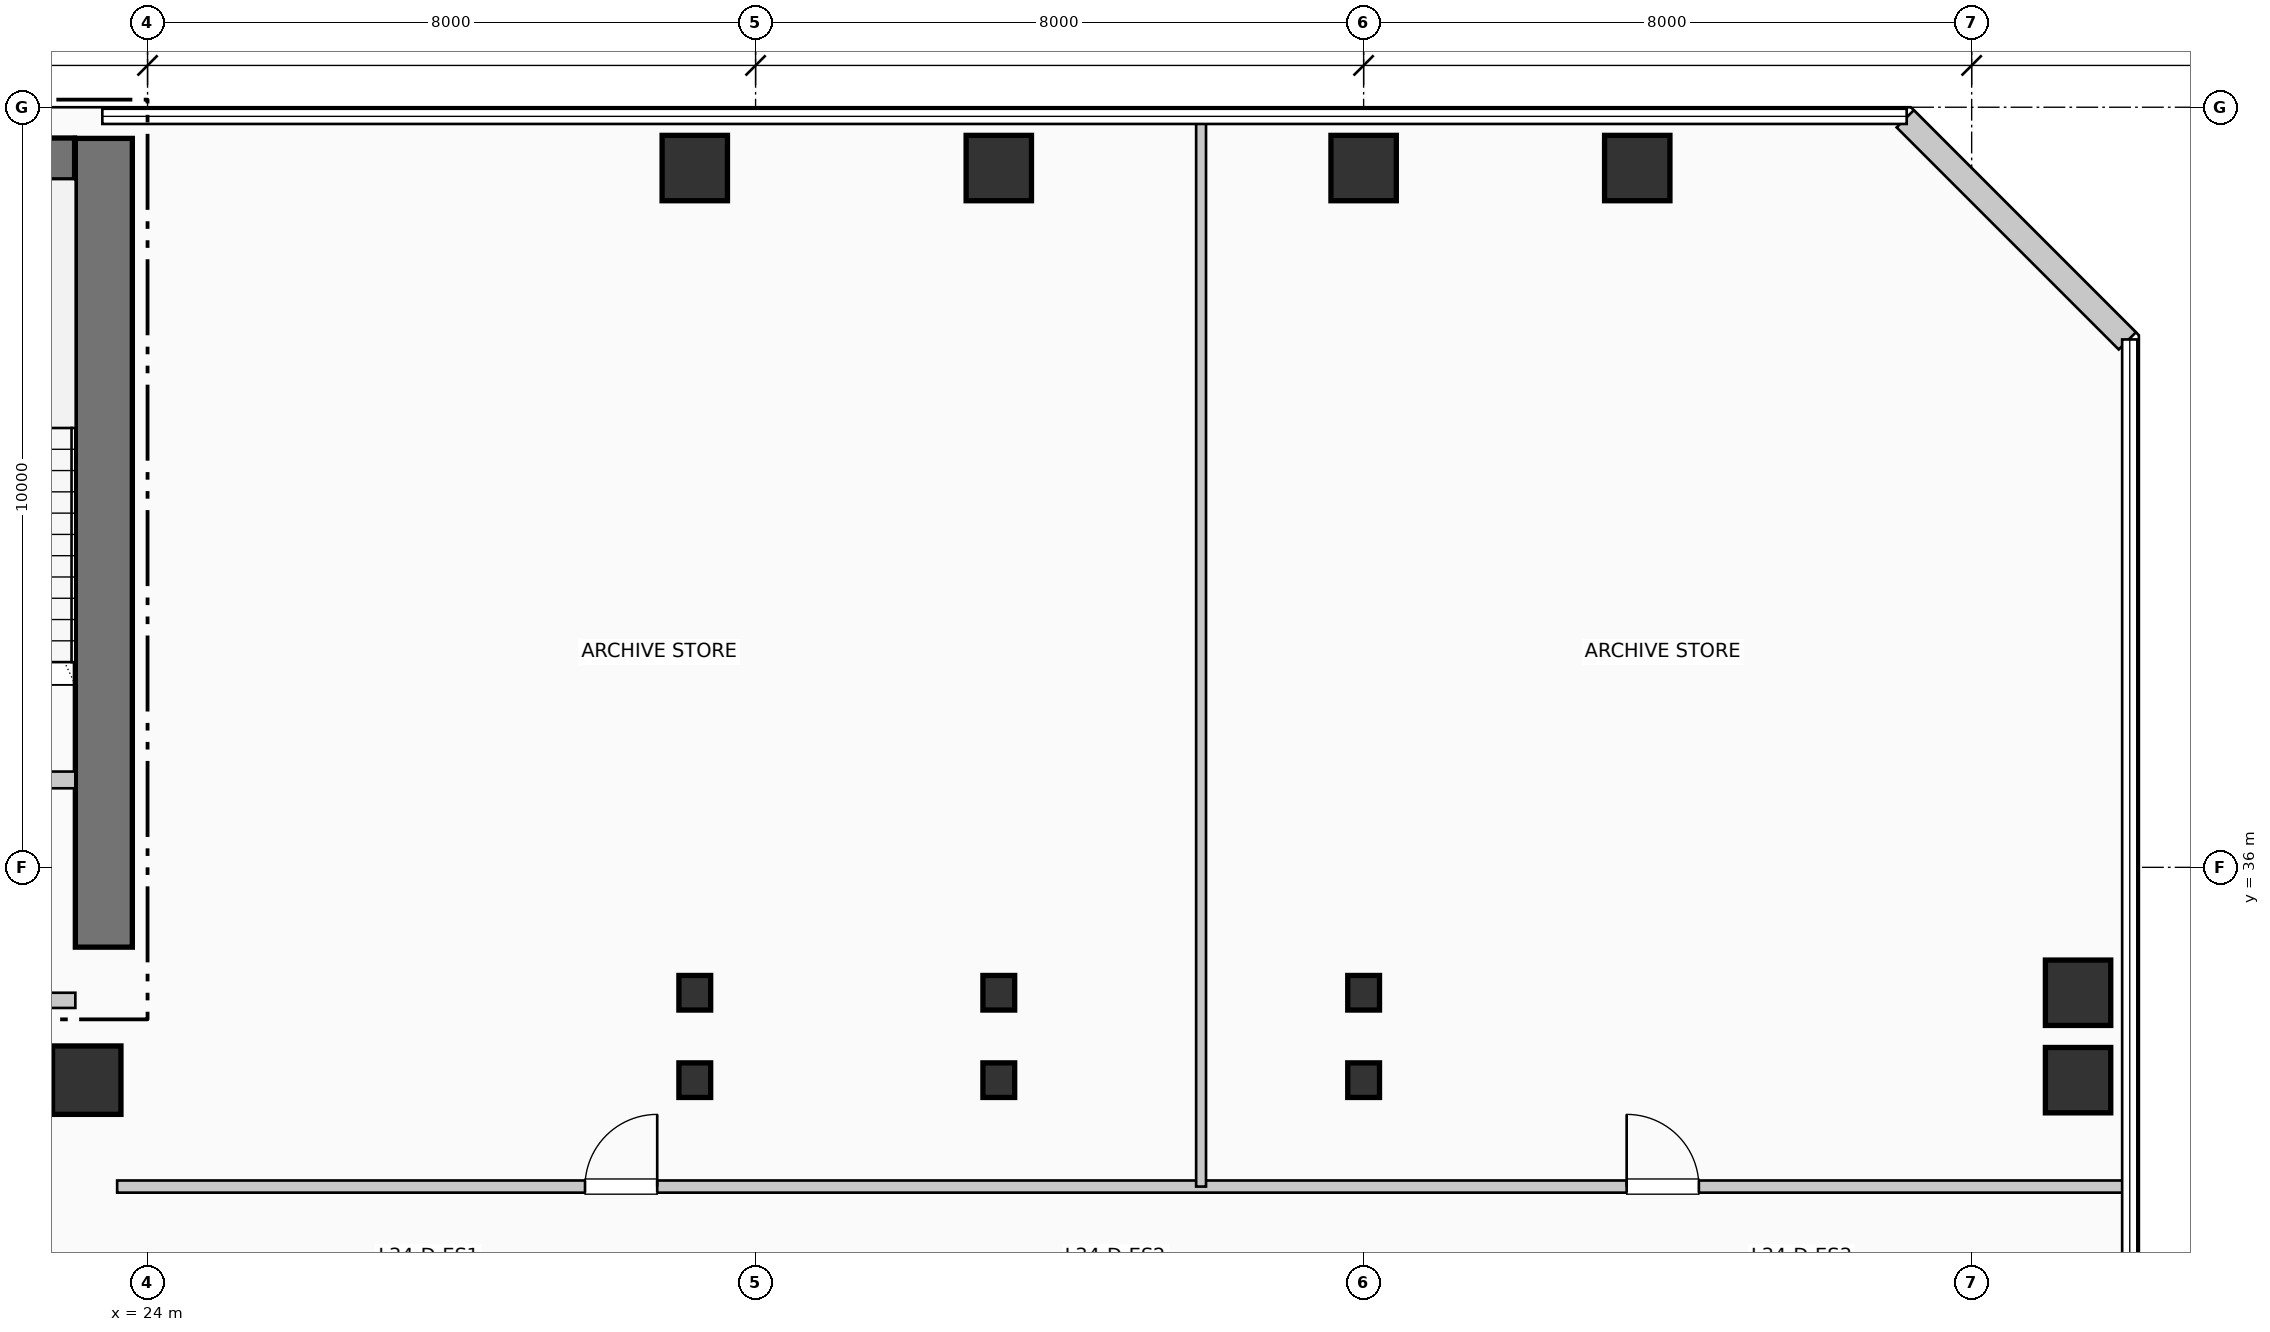
"""IFC4 building model, lengths in metres.
Left out: names, types, materials, properties, quantities, classifications, styles, units other than length and angle.
Written with IfcOpenShell. Run it as: python <this file> out.ifc"""

import sys

from ifc_helpers import new_model, si_unit, direction, frame, frame_2d, origin, origin_2d, place, context, subcontext, project, spatial, rectangle, i_section, extrude, element, fill, save


model = new_model("IFC4")
c1 = context("Model", 3, precision=1e-05, world=origin(), true_north=direction((0.0, 1.0)))
c2 = subcontext(c1, "Body", "Model", "MODEL_VIEW")
j1 = project(units=[si_unit("LENGTHUNIT", "METRE"), si_unit("PLANEANGLEUNIT", "RADIAN")], contexts=[c1])
p1 = place(None, origin())
s1 = spatial("IfcSite", under=j1, at=p1, CompositionType="ELEMENT")
p2 = place(p1, origin())
s2 = spatial("IfcBuilding", under=s1, at=p2, CompositionType="ELEMENT")
p3 = place(p2, frame((0.0, 0.0, 142.89)))
s3 = spatial("IfcBuildingStorey", under=s2, at=p3, CompositionType="ELEMENT", Elevation=142.89)
p4 = place(p3, frame((23.425, 34.95, 0.0), z_axis=(0.0, 0.0, 1.0), x_axis=(0.0, 1.0, 0.0)))
e1 = element("IfcWall", 1, at=p4, inside=s3, PredefinedType="SHEAR", context=c2, shape_type="SweptSolid", body=[
    extrude(rectangle(XDim=10.64, YDim=0.75, at=frame_2d((5.32, 0.0))), origin(), (0.0, 0.0, 1.0), 3.96),
])
p5 = place(p3, frame((19.35, 45.32, 0.0), z_axis=(0.0, 0.0, 1.0), x_axis=(1.0, 0.0, 0.0)))
e2 = element("IfcWall", 2, at=p5, inside=s3, PredefinedType="SHEAR", context=c2, shape_type="SweptSolid", body=[
    extrude(rectangle(XDim=3.69, YDim=0.55, at=frame_2d((1.845, 0.0))), origin(), (0.0, 0.0, 1.0), 3.96),
])
p6 = place(p5, frame((1.15, 0.0, 1.05)))
e3 = element("IfcOpeningElement", 3, at=p6, cuts=e2, PredefinedType="OPENING", context=c2, shape_type="SweptSolid", body=[
    extrude(rectangle(XDim=1.4, YDim=1.8, at=frame_2d((0.7, 0.9))), frame((0.0, 0.285, 0.0), z_axis=(0.0, -1.0, 0.0), x_axis=(1.0, 0.0, 0.0)), (0.0, 0.0, 1.0), 0.57),
])
p7 = place(p3, frame((23.2, 33.2, 0.0), z_axis=(0.0, 0.0, 1.0), x_axis=(1.0, 0.0, 0.0)))
e4 = element("IfcColumn", 4, at=p7, inside=s3, PredefinedType="COLUMN", context=c2, shape_type="SweptSolid", body=[
    extrude(rectangle(XDim=0.9, YDim=0.9, at=origin_2d()), origin(), (0.0, 0.0, 1.0), 3.96),
])
for number, where, z_axis, x_axis in (
    (5, (31.2, 33.2, 0.0), (0.0, 0.0, 1.0), (1.0, 0.0, 0.0)),
    (6, (31.2, 34.35, 0.0), (0.0, 0.0, 1.0), (1.0, 0.0, 0.0)),
):
    element("IfcColumn", number, at=place(p3, frame(where, z_axis=z_axis, x_axis=x_axis)), inside=s3, PredefinedType="COLUMN", context=c2, shape_type="SweptSolid", body=[
        extrude(i_section(OverallWidth=0.418, OverallDepth=0.455, WebThickness=0.032, FlangeThickness=0.051, at=origin_2d()), origin(), (0.0, 0.0, 1.0), 3.96),
    ])
p8 = place(p3, frame((31.2, 45.2, 0.0), z_axis=(0.0, 0.0, 1.0), x_axis=(1.0, 0.0, 0.0)))
e7 = element("IfcColumn", 7, at=p8, inside=s3, PredefinedType="COLUMN", context=c2, shape_type="SweptSolid", body=[
    extrude(rectangle(XDim=0.86, YDim=0.86, at=origin_2d()), origin(), (0.0, 0.0, 1.0), 3.96),
])
for number, where, z_axis, x_axis in (
    (8, (35.2, 33.2, 0.0), (0.0, 0.0, 1.0), (1.0, 0.0, 0.0)),
    (9, (35.2, 34.35, 0.0), (0.0, 0.0, 1.0), (1.0, 0.0, 0.0)),
):
    element("IfcColumn", number, at=place(p3, frame(where, z_axis=z_axis, x_axis=x_axis)), inside=s3, PredefinedType="COLUMN", context=c2, shape_type="SweptSolid", body=[
        extrude(i_section(OverallWidth=0.418, OverallDepth=0.455, WebThickness=0.032, FlangeThickness=0.051, at=origin_2d()), origin(), (0.0, 0.0, 1.0), 3.96),
    ])
p9 = place(p3, frame((35.2, 45.2, 0.0), z_axis=(0.0, 0.0, 1.0), x_axis=(1.0, 0.0, 0.0)))
e10 = element("IfcColumn", 10, at=p9, inside=s3, PredefinedType="COLUMN", context=c2, shape_type="SweptSolid", body=[
    extrude(rectangle(XDim=0.86, YDim=0.86, at=origin_2d()), origin(), (0.0, 0.0, 1.0), 3.96),
])
for number, where, z_axis, x_axis in (
    (11, (40.0, 33.2, 0.0), (0.0, 0.0, 1.0), (1.0, 0.0, 0.0)),
    (12, (40.0, 34.35, 0.0), (0.0, 0.0, 1.0), (1.0, 0.0, 0.0)),
):
    element("IfcColumn", number, at=place(p3, frame(where, z_axis=z_axis, x_axis=x_axis)), inside=s3, PredefinedType="COLUMN", context=c2, shape_type="SweptSolid", body=[
        extrude(i_section(OverallWidth=0.418, OverallDepth=0.455, WebThickness=0.032, FlangeThickness=0.051, at=origin_2d()), origin(), (0.0, 0.0, 1.0), 3.96),
    ])
for number, where, z_axis, x_axis in (
    (13, (40.0, 45.2, 0.0), (0.0, 0.0, 1.0), (1.0, 0.0, 0.0)),
    (14, (43.6, 45.2, 0.0), (0.0, 0.0, 1.0), (1.0, 0.0, 0.0)),
    (15, (49.4, 33.2, 0.0), (0.0, 0.0, 1.0), (1.0, 0.0, 0.0)),
    (16, (49.4, 34.35, 0.0), (0.0, 0.0, 1.0), (1.0, 0.0, 0.0)),
):
    element("IfcColumn", number, at=place(p3, frame(where, z_axis=z_axis, x_axis=x_axis)), inside=s3, PredefinedType="COLUMN", context=c2, shape_type="SweptSolid", body=[
        extrude(rectangle(XDim=0.86, YDim=0.86, at=origin_2d()), origin(), (0.0, 0.0, 1.0), 3.96),
    ])
p10 = place(p3, frame((50.048, 42.926, 0.0), z_axis=(0.0, 0.0, 1.0), x_axis=(-0.707136318428, 0.707077242712, 0.0)))
e17 = element("IfcWall", 17, at=p10, inside=s3, PredefinedType="SOLIDWALL", context=c2, shape_type="SweptSolid", body=[
    extrude(rectangle(XDim=4.133, YDim=0.32, at=frame_2d((2.066, 0.0))), origin(), (0.0, 0.0, 1.0), 3.71),
])
p11 = place(p3, frame((19.9, 37.15, 0.0), z_axis=(0.0, 0.0, 1.0), x_axis=(1.0, 0.0, 0.0)))
e18 = element("IfcWall", 18, at=p11, inside=s3, PredefinedType="PARTITIONING", context=c2, shape_type="SweptSolid", body=[
    extrude(rectangle(XDim=3.15, YDim=0.22, at=frame_2d((1.575, 0.0))), origin(), (0.0, 0.0, 1.0), 3.71),
])
p12 = place(p11, frame((2.05, 0.0, 0.0), z_axis=(0.0, 0.0, 1.0), x_axis=(-1.0, 0.0, 0.0)))
e19 = element("IfcOpeningElement", 19, at=p12, cuts=e18, PredefinedType="OPENING", context=c2, shape_type="SweptSolid", body=[
    extrude(rectangle(XDim=1.05, YDim=2.15, at=frame_2d((0.525, 1.075))), frame((0.0, 0.12, 0.0), z_axis=(0.0, -1.0, 0.0), x_axis=(1.0, 0.0, 0.0)), (0.0, 0.0, 1.0), 0.24),
])
p13 = place(p3, frame((19.8, 34.25, 0.0), z_axis=(0.0, 0.0, 1.0), x_axis=(1.0, 0.0, 0.0)))
e20 = element("IfcWall", 20, at=p13, inside=s3, PredefinedType="PARTITIONING", context=c2, shape_type="SweptSolid", body=[
    extrude(rectangle(XDim=3.25, YDim=0.2, at=frame_2d((1.625, 0.0))), origin(), (0.0, 0.0, 1.0), 3.71),
])
p14 = place(p13, frame((2.15, 0.0, 0.0), z_axis=(0.0, 0.0, 1.0), x_axis=(-1.0, 0.0, 0.0)))
e21 = element("IfcOpeningElement", 21, at=p14, cuts=e20, PredefinedType="OPENING", context=c2, shape_type="SweptSolid", body=[
    extrude(rectangle(XDim=1.1, YDim=2.15, at=frame_2d((0.55, 1.075))), frame((0.0, 0.11, 0.0), z_axis=(0.0, -1.0, 0.0), x_axis=(1.0, 0.0, 0.0)), (0.0, 0.0, 1.0), 0.22),
])
p15 = place(p3, frame((23.6, 31.8, 0.0), z_axis=(0.0, 0.0, 1.0), x_axis=(1.0, 0.0, 0.0)))
e22 = element("IfcWall", 22, at=p15, inside=s3, PredefinedType="PARTITIONING", context=c2, shape_type="SweptSolid", body=[
    extrude(rectangle(XDim=26.41, YDim=0.16, at=frame_2d((13.205, 0.0))), origin(), (0.0, 0.0, 1.0), 3.71),
])
p16 = place(p15, frame((6.156, 0.0, 0.0)))
e23 = element("IfcOpeningElement", 23, at=p16, cuts=e22, PredefinedType="OPENING", context=c2, shape_type="SweptSolid", body=[
    extrude(rectangle(XDim=0.95, YDim=2.15, at=frame_2d((0.475, 1.075))), frame((0.0, 0.09, 0.0), z_axis=(0.0, -1.0, 0.0), x_axis=(1.0, 0.0, 0.0)), (0.0, 0.0, 1.0), 0.18),
])
p17 = place(p15, frame((19.861, 0.0, 0.0)))
e24 = element("IfcOpeningElement", 24, at=p17, cuts=e22, PredefinedType="OPENING", context=c2, shape_type="SweptSolid", body=[
    extrude(rectangle(XDim=0.95, YDim=2.15, at=frame_2d((0.475, 1.075))), frame((0.0, 0.09, 0.0), z_axis=(0.0, -1.0, 0.0), x_axis=(1.0, 0.0, 0.0)), (0.0, 0.0, 1.0), 0.18),
])
p18 = place(p3, frame((37.861, 31.8, 0.0), z_axis=(0.0, 0.0, 1.0), x_axis=(0.0, 1.0, 0.0)))
e25 = element("IfcWall", 25, at=p18, inside=s3, PredefinedType="PARTITIONING", context=c2, shape_type="SweptSolid", body=[
    extrude(rectangle(XDim=14.01, YDim=0.13, at=frame_2d((7.005, 0.0))), origin(), (0.0, 0.0, 1.0), 3.71),
])
p19 = place(p16, origin())
e26 = element("IfcDoor", 26, at=p19, inside=s3, OperationType="SINGLE_SWING_RIGHT", PredefinedType="DOOR", context=c2, shape_type="SweptSolid", body=[
    extrude(rectangle(XDim=0.95, YDim=2.15, at=frame_2d((0.475, 1.075))), frame((0.0, 0.025, 0.0), z_axis=(0.0, -1.0, 0.0), x_axis=(1.0, 0.0, 0.0)), (0.0, 0.0, 1.0), 0.05),
])
fill(e23, e26)
p20 = place(p17, origin())
e27 = element("IfcDoor", 27, at=p20, inside=s3, OperationType="SINGLE_SWING_LEFT", PredefinedType="DOOR", context=c2, shape_type="SweptSolid", body=[
    extrude(rectangle(XDim=0.95, YDim=2.15, at=frame_2d((0.475, 1.075))), frame((0.0, 0.025, 0.0), z_axis=(0.0, -1.0, 0.0), x_axis=(1.0, 0.0, 0.0)), (0.0, 0.0, 1.0), 0.05),
])
fill(e24, e27)
save(model, sys.argv[1])
